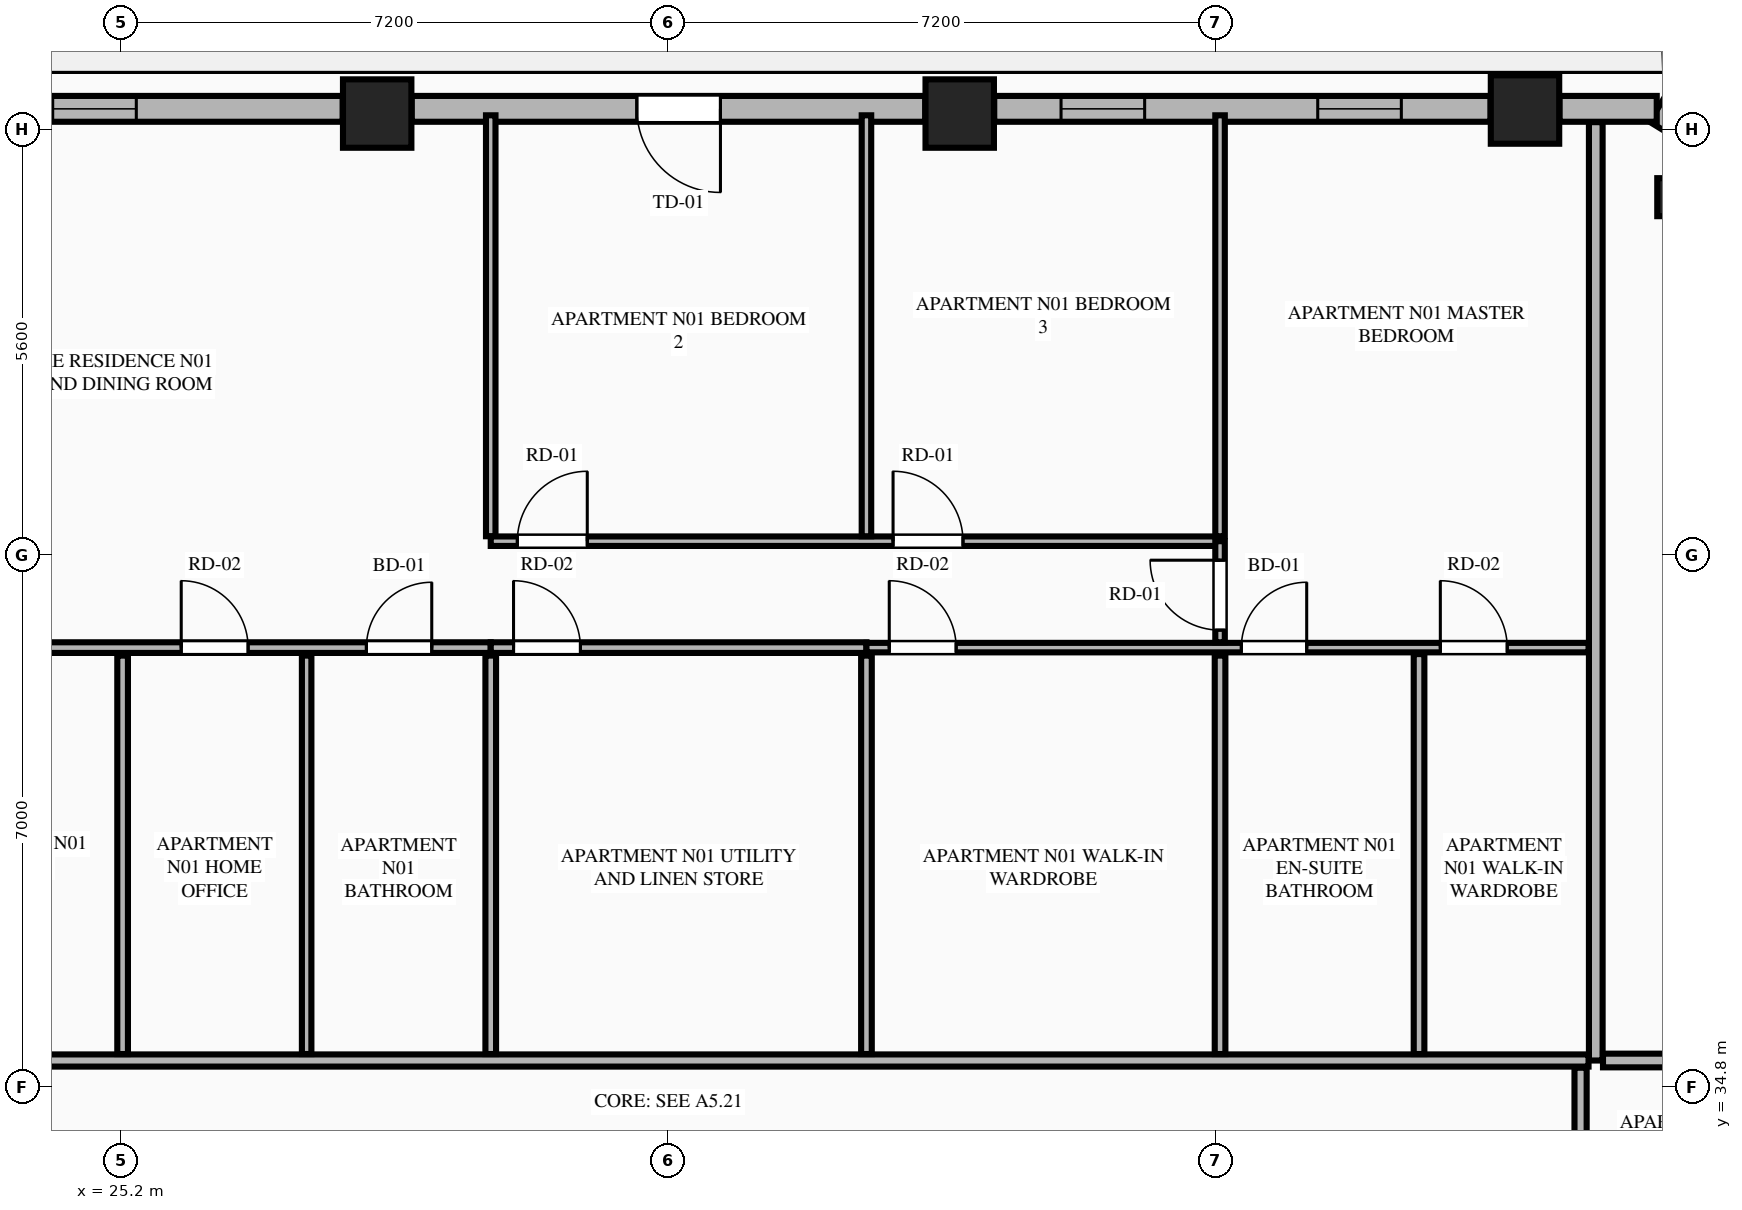
"""IFC4 building model, lengths in metres.
Left out: names, types, materials, properties, quantities, classifications, styles, units other than length and angle.
Written with IfcOpenShell. Run it as: python <this file> out.ifc"""

import sys

from ifc_helpers import new_model, si_unit, direction, frame, frame_2d, origin, origin_2d, place, context, subcontext, project, spatial, rectangle, extrude, element, fill, save


model = new_model("IFC4")
c1 = context("Model", 3, precision=1e-05, world=origin(), true_north=direction((0.0, 1.0)))
c2 = subcontext(c1, "Body", "Model", "MODEL_VIEW")
j1 = project(units=[si_unit("LENGTHUNIT", "METRE"), si_unit("PLANEANGLEUNIT", "RADIAN")], contexts=[c1])
p1 = place(None, origin())
s1 = spatial("IfcSite", under=j1, at=p1, CompositionType="ELEMENT")
p2 = place(p1, origin())
s2 = spatial("IfcBuilding", under=s1, at=p2, CompositionType="ELEMENT")
p3 = place(p2, frame((0.0, 0.0, 160.6)))
s3 = spatial("IfcBuildingStorey", under=s2, at=p3, CompositionType="ELEMENT", Elevation=160.6)
for number, where, z_axis, x_axis in (
    (1, (43.669, 47.661, 0.0), (0.0, 0.0, 1.0), (1.0, 0.0, 0.0)),
    (2, (36.232, 47.608, 0.0), (0.0, 0.0, 1.0), (1.0, 0.0, 0.0)),
    (3, (28.568, 47.608, 0.0), (0.0, 0.0, 1.0), (1.0, 0.0, 0.0)),
):
    element("IfcColumn", number, at=place(p3, frame(where, z_axis=z_axis, x_axis=x_axis)), inside=s3, PredefinedType="COLUMN", context=c2, shape_type="SweptSolid", body=[
        extrude(rectangle(XDim=0.9, YDim=0.9, at=origin_2d()), origin(), (0.0, 0.0, 1.0), 3.55),
    ])
p4 = place(p3, frame((45.659, 46.508, 0.0), z_axis=(0.0, 0.0, 1.0), x_axis=(-0.865160173452, 0.501495637342, 0.0)))
e4 = element("IfcColumn", 4, at=p4, inside=s3, PredefinedType="PILASTER", context=c2, shape_type="SweptSolid", body=[
    extrude(rectangle(XDim=0.5, YDim=0.35, at=origin_2d()), origin(), (0.0, 0.0, 1.0), 3.55),
])
p5 = place(p3, frame((46.971, 46.677, 0.0), z_axis=(0.0, 0.0, 1.0), x_axis=(-0.851798915137, 0.523868884523, 0.0)))
e5 = element("IfcWall", 5, at=p5, inside=s3, PredefinedType="STANDARD", context=c2, shape_type="SweptSolid", body=[
    extrude(rectangle(XDim=1.848, YDim=0.34, at=frame_2d((0.924, 0.0))), origin(), (0.0, 0.0, 1.0), 3.34),
])
p6 = place(p3, frame((45.402, 47.67, 0.0), z_axis=(0.0, 0.0, 1.0), x_axis=(-1.0, 0.0, 0.0)))
e6 = element("IfcWall", 6, at=p6, inside=s3, PredefinedType="STANDARD", context=c2, shape_type="SweptSolid", body=[
    extrude(rectangle(XDim=1.279, YDim=0.34, at=frame_2d((0.64, 0.0))), origin(), (0.0, 0.0, 1.0), 3.34),
])
p7 = place(p3, frame((43.215, 47.67, 0.0), z_axis=(0.0, 0.0, 1.0), x_axis=(-1.0, 0.0, 0.0)))
e7 = element("IfcWall", 7, at=p7, inside=s3, PredefinedType="STANDARD", context=c2, shape_type="SweptSolid", body=[
    extrude(rectangle(XDim=6.529, YDim=0.34, at=frame_2d((3.265, 0.0))), origin(), (0.0, 0.0, 1.0), 2.797),
])
p8 = place(p7, frame((1.173, 0.0, 0.75)))
e8 = element("IfcOpeningElement", 8, at=p8, cuts=e7, PredefinedType="OPENING", context=c2, shape_type="SweptSolid", body=[
    extrude(rectangle(XDim=1.1, YDim=1.897, at=frame_2d((0.55, 0.948))), frame((0.0, 0.18, 0.0), z_axis=(0.0, -1.0, 0.0), x_axis=(1.0, 0.0, 0.0)), (0.0, 0.0, 1.0), 0.36),
])
p9 = place(p7, frame((4.55, 0.0, 0.75)))
e9 = element("IfcOpeningElement", 9, at=p9, cuts=e7, PredefinedType="OPENING", context=c2, shape_type="SweptSolid", body=[
    extrude(rectangle(XDim=1.1, YDim=1.897, at=frame_2d((0.55, 0.948))), frame((0.0, 0.18, 0.0), z_axis=(0.0, -1.0, 0.0), x_axis=(1.0, 0.0, 0.0)), (0.0, 0.0, 1.0), 0.36),
])
p10 = place(p3, frame((35.778, 47.67, 0.0), z_axis=(0.0, 0.0, 1.0), x_axis=(-1.0, 0.0, 0.0)))
e10 = element("IfcWall", 10, at=p10, inside=s3, PredefinedType="STANDARD", context=c2, shape_type="SweptSolid", body=[
    extrude(rectangle(XDim=6.756, YDim=0.34, at=frame_2d((3.378, 0.0))), origin(), (0.0, 0.0, 1.0), 2.797),
])
p11 = place(p10, frame((2.694, 0.0, 0.0)))
e11 = element("IfcOpeningElement", 11, at=p11, cuts=e10, PredefinedType="OPENING", context=c2, shape_type="SweptSolid", body=[
    extrude(rectangle(XDim=1.1, YDim=2.25, at=frame_2d((0.55, 1.125))), frame((0.0, 0.18, 0.0), z_axis=(0.0, -1.0, 0.0), x_axis=(1.0, 0.0, 0.0)), (0.0, 0.0, 1.0), 0.36),
])
p12 = place(p3, frame((28.114, 47.67, 0.0), z_axis=(0.0, 0.0, 1.0), x_axis=(-1.0, 0.0, 0.0)))
e12 = element("IfcWall", 12, at=p12, inside=s3, PredefinedType="STANDARD", context=c2, shape_type="SweptSolid", body=[
    extrude(rectangle(XDim=6.529, YDim=0.34, at=frame_2d((3.265, 0.0))), origin(), (0.0, 0.0, 1.0), 2.797),
])
p13 = place(p12, frame((2.715, 0.0, 0.75)))
e13 = element("IfcOpeningElement", 13, at=p13, cuts=e12, PredefinedType="OPENING", context=c2, shape_type="SweptSolid", body=[
    extrude(rectangle(XDim=1.1, YDim=1.897, at=frame_2d((0.55, 0.948))), frame((0.0, 0.18, 0.0), z_axis=(0.0, -1.0, 0.0), x_axis=(1.0, 0.0, 0.0)), (0.0, 0.0, 1.0), 0.36),
])
p14 = place(p3, frame((44.6, 35.15, 0.0), z_axis=(0.0, 0.0, 1.0), x_axis=(0.0, 1.0, 0.0)))
e14 = element("IfcWall", 14, at=p14, inside=s3, PredefinedType="PARTITIONING", context=c2, shape_type="SweptSolid", body=[
    extrude(rectangle(XDim=12.345, YDim=0.18, at=frame_2d((6.173, 0.0))), origin(), (0.0, 0.0, 1.0), 3.34),
])
p15 = place(p3, frame((20.295, 35.15, 0.0), z_axis=(0.0, 0.0, 1.0), x_axis=(1.0, 0.0, 0.0)))
e15 = element("IfcWall", 15, at=p15, inside=s3, PredefinedType="PARTITIONING", context=c2, shape_type="SweptSolid", body=[
    extrude(rectangle(XDim=24.21, YDim=0.16, at=frame_2d((12.105, 0.0))), origin(), (0.0, 0.0, 1.0), 3.34),
])
p16 = place(p15, frame((0.405, 0.0, 0.0)))
e16 = element("IfcOpeningElement", 16, at=p16, cuts=e15, PredefinedType="OPENING", context=c2, shape_type="SweptSolid", body=[
    extrude(rectangle(XDim=1.35, YDim=2.35, at=frame_2d((0.675, 1.175))), frame((0.0, 0.09, 0.0), z_axis=(0.0, -1.0, 0.0), x_axis=(1.0, 0.0, 0.0)), (0.0, 0.0, 1.0), 0.18),
])
p17 = place(p3, frame((22.25, 40.582, 0.0), z_axis=(0.0, 0.0, 1.0), x_axis=(1.0, 0.0, 0.0)))
e17 = element("IfcWall", 17, at=p17, inside=s3, PredefinedType="PLUMBINGWALL", context=c2, shape_type="SweptSolid", body=[
    extrude(rectangle(XDim=7.812, YDim=0.14, at=frame_2d((3.906, 0.0))), origin(), (0.0, 0.0, 1.0), 3.34),
])
p18 = place(p17, frame((6.176, 0.0, 0.0)))
e18 = element("IfcOpeningElement", 18, at=p18, cuts=e17, PredefinedType="OPENING", context=c2, shape_type="SweptSolid", body=[
    extrude(rectangle(XDim=0.86, YDim=2.1, at=frame_2d((0.43, 1.05))), frame((0.0, 0.08, 0.0), z_axis=(0.0, -1.0, 0.0), x_axis=(1.0, 0.0, 0.0)), (0.0, 0.0, 1.0), 0.16),
])
p19 = place(p17, frame((0.26, 0.0, 0.0)))
e19 = element("IfcOpeningElement", 19, at=p19, cuts=e17, PredefinedType="OPENING", context=c2, shape_type="SweptSolid", body=[
    extrude(rectangle(XDim=0.88, YDim=2.15, at=frame_2d((0.44, 1.075))), frame((0.0, 0.08, 0.0), z_axis=(0.0, -1.0, 0.0), x_axis=(1.0, 0.0, 0.0)), (0.0, 0.0, 1.0), 0.16),
])
p20 = place(p17, frame((3.74, 0.0, 0.0)))
e20 = element("IfcOpeningElement", 20, at=p20, cuts=e17, PredefinedType="OPENING", context=c2, shape_type="SweptSolid", body=[
    extrude(rectangle(XDim=0.88, YDim=2.15, at=frame_2d((0.44, 1.075))), frame((0.0, 0.08, 0.0), z_axis=(0.0, -1.0, 0.0), x_axis=(1.0, 0.0, 0.0)), (0.0, 0.0, 1.0), 0.16),
])
p21 = place(p3, frame((30.062, 40.582, 0.0), z_axis=(0.0, 0.0, 1.0), x_axis=(1.0, 0.0, 0.0)))
e21 = element("IfcWall", 21, at=p21, inside=s3, PredefinedType="PLUMBINGWALL", context=c2, shape_type="SweptSolid", body=[
    extrude(rectangle(XDim=4.943, YDim=0.14, at=frame_2d((2.471, 0.0))), origin(), (0.0, 0.0, 1.0), 3.34),
])
p22 = place(p21, frame((0.3, 0.0, 0.0)))
e22 = element("IfcOpeningElement", 22, at=p22, cuts=e21, PredefinedType="OPENING", context=c2, shape_type="SweptSolid", body=[
    extrude(rectangle(XDim=0.88, YDim=2.15, at=frame_2d((0.44, 1.075))), frame((0.0, 0.08, 0.0), z_axis=(0.0, -1.0, 0.0), x_axis=(1.0, 0.0, 0.0)), (0.0, 0.0, 1.0), 0.16),
])
p23 = place(p3, frame((35.005, 40.582, 0.0), z_axis=(0.0, 0.0, 1.0), x_axis=(1.0, 0.0, 0.0)))
e23 = element("IfcWall", 23, at=p23, inside=s3, PredefinedType="PARTITIONING", context=c2, shape_type="SweptSolid", body=[
    extrude(rectangle(XDim=9.5, YDim=0.125, at=frame_2d((4.75, 0.0))), origin(), (0.0, 0.0, 1.0), 3.34),
])
p24 = place(p23, frame((4.932, 0.0, 0.0)))
e24 = element("IfcOpeningElement", 24, at=p24, cuts=e23, PredefinedType="OPENING", context=c2, shape_type="SweptSolid", body=[
    extrude(rectangle(XDim=0.86, YDim=2.1, at=frame_2d((0.43, 1.05))), frame((0.0, 0.073, 0.0), z_axis=(0.0, -1.0, 0.0), x_axis=(1.0, 0.0, 0.0)), (0.0, 0.0, 1.0), 0.145),
])
p25 = place(p23, frame((7.55, 0.0, 0.0)))
e25 = element("IfcOpeningElement", 25, at=p25, cuts=e23, PredefinedType="OPENING", context=c2, shape_type="SweptSolid", body=[
    extrude(rectangle(XDim=0.88, YDim=2.15, at=frame_2d((0.44, 1.075))), frame((0.0, 0.073, 0.0), z_axis=(0.0, -1.0, 0.0), x_axis=(1.0, 0.0, 0.0)), (0.0, 0.0, 1.0), 0.145),
])
p26 = place(p23, frame((0.3, 0.0, 0.0)))
e26 = element("IfcOpeningElement", 26, at=p26, cuts=e23, PredefinedType="OPENING", context=c2, shape_type="SweptSolid", body=[
    extrude(rectangle(XDim=0.88, YDim=2.15, at=frame_2d((0.44, 1.075))), frame((0.0, 0.073, 0.0), z_axis=(0.0, -1.0, 0.0), x_axis=(1.0, 0.0, 0.0)), (0.0, 0.0, 1.0), 0.145),
])
p27 = place(p3, frame((25.219, 35.235, 0.0), z_axis=(0.0, 0.0, 1.0), x_axis=(0.0, 1.0, 0.0)))
e27 = element("IfcWall", 27, at=p27, inside=s3, PredefinedType="PLUMBINGWALL", context=c2, shape_type="SweptSolid", body=[
    extrude(rectangle(XDim=5.242, YDim=0.14, at=frame_2d((2.621, 0.0))), origin(), (0.0, 0.0, 1.0), 3.34),
])
p28 = place(p3, frame((27.64, 35.235, 0.0), z_axis=(0.0, 0.0, 1.0), x_axis=(0.0, 1.0, 0.0)))
e28 = element("IfcWall", 28, at=p28, inside=s3, PredefinedType="PARTITIONING", context=c2, shape_type="SweptSolid", body=[
    extrude(rectangle(XDim=5.242, YDim=0.125, at=frame_2d((2.621, 0.0))), origin(), (0.0, 0.0, 1.0), 3.34),
])
p29 = place(p3, frame((30.062, 42.047, 0.0), z_axis=(0.0, 0.0, 1.0), x_axis=(0.0, 1.0, 0.0)))
e29 = element("IfcWall", 29, at=p29, inside=s3, PredefinedType="PARTITIONING", context=c2, shape_type="SweptSolid", body=[
    extrude(rectangle(XDim=5.538, YDim=0.125, at=frame_2d((2.769, 0.0))), origin(), (0.0, 0.0, 1.0), 3.34),
])
p30 = place(p3, frame((30.062, 41.982, 0.0), z_axis=(0.0, 0.0, 1.0), x_axis=(1.0, 0.0, 0.0)))
e30 = element("IfcWall", 30, at=p30, inside=s3, PredefinedType="PARTITIONING", context=c2, shape_type="SweptSolid", body=[
    extrude(rectangle(XDim=9.595, YDim=0.125, at=frame_2d((4.797, 0.0))), origin(), (0.0, 0.0, 1.0), 3.34),
])
p31 = place(p30, frame((0.35, 0.0, 0.0)))
e31 = element("IfcOpeningElement", 31, at=p31, cuts=e30, PredefinedType="OPENING", context=c2, shape_type="SweptSolid", body=[
    extrude(rectangle(XDim=0.92, YDim=2.15, at=frame_2d((0.46, 1.075))), frame((0.0, 0.073, 0.0), z_axis=(0.0, -1.0, 0.0), x_axis=(1.0, 0.0, 0.0)), (0.0, 0.0, 1.0), 0.145),
])
p32 = place(p30, frame((5.293, 0.0, 0.0)))
e32 = element("IfcOpeningElement", 32, at=p32, cuts=e30, PredefinedType="OPENING", context=c2, shape_type="SweptSolid", body=[
    extrude(rectangle(XDim=0.92, YDim=2.15, at=frame_2d((0.46, 1.075))), frame((0.0, 0.073, 0.0), z_axis=(0.0, -1.0, 0.0), x_axis=(1.0, 0.0, 0.0)), (0.0, 0.0, 1.0), 0.145),
])
p33 = place(p3, frame((39.657, 40.652, 0.0), z_axis=(0.0, 0.0, 1.0), x_axis=(0.0, 1.0, 0.0)))
e33 = element("IfcWall", 33, at=p33, inside=s3, PredefinedType="PARTITIONING", context=c2, shape_type="SweptSolid", body=[
    extrude(rectangle(XDim=1.33, YDim=0.125, at=frame_2d((0.665, 0.0))), origin(), (0.0, 0.0, 1.0), 3.34),
])
p34 = place(p33, frame((0.16, 0.0, 0.0)))
e34 = element("IfcOpeningElement", 34, at=p34, cuts=e33, PredefinedType="OPENING", context=c2, shape_type="SweptSolid", body=[
    extrude(rectangle(XDim=0.92, YDim=2.15, at=frame_2d((0.46, 1.075))), frame((0.0, 0.073, 0.0), z_axis=(0.0, -1.0, 0.0), x_axis=(1.0, 0.0, 0.0)), (0.0, 0.0, 1.0), 0.145),
])
for number, where, z_axis, x_axis in (
    (35, (30.062, 35.235, 0.0), (0.0, 0.0, 1.0), (0.0, 1.0, 0.0)),
    (36, (35.005, 35.235, 0.0), (0.0, 0.0, 1.0), (0.0, 1.0, 0.0)),
):
    element("IfcWall", number, at=place(p3, frame(where, z_axis=z_axis, x_axis=x_axis)), inside=s3, PredefinedType="PLUMBINGWALL", context=c2, shape_type="SweptSolid", body=[
        extrude(rectangle(XDim=5.242, YDim=0.14, at=frame_2d((2.621, 0.0))), origin(), (0.0, 0.0, 1.0), 3.34),
    ])
for number, where, z_axis, x_axis in (
    (37, (35.005, 42.047, 0.0), (0.0, 0.0, 1.0), (0.0, 1.0, 0.0)),
    (38, (39.657, 42.047, 0.0), (0.0, 0.0, 1.0), (0.0, 1.0, 0.0)),
):
    element("IfcWall", number, at=place(p3, frame(where, z_axis=z_axis, x_axis=x_axis)), inside=s3, PredefinedType="PARTITIONING", context=c2, shape_type="SweptSolid", body=[
        extrude(rectangle(XDim=5.538, YDim=0.125, at=frame_2d((2.769, 0.0))), origin(), (0.0, 0.0, 1.0), 3.34),
    ])
p35 = place(p3, frame((39.657, 35.235, 0.0), z_axis=(0.0, 0.0, 1.0), x_axis=(0.0, 1.0, 0.0)))
e39 = element("IfcWall", 39, at=p35, inside=s3, PredefinedType="PLUMBINGWALL", context=c2, shape_type="SweptSolid", body=[
    extrude(rectangle(XDim=5.242, YDim=0.14, at=frame_2d((2.621, 0.0))), origin(), (0.0, 0.0, 1.0), 3.34),
])
p36 = place(p3, frame((42.275, 35.235, 0.0), z_axis=(0.0, 0.0, 1.0), x_axis=(0.0, 1.0, 0.0)))
e40 = element("IfcWall", 40, at=p36, inside=s3, PredefinedType="PLUMBINGWALL", context=c2, shape_type="SweptSolid", body=[
    extrude(rectangle(XDim=5.262, YDim=0.14, at=frame_2d((2.631, 0.0))), origin(), (0.0, 0.0, 1.0), 2.722),
])
p37 = place(p3, frame((44.695, 35.15, 0.0), z_axis=(0.0, 0.0, 1.0), x_axis=(1.0, 0.0, 0.0)))
e41 = element("IfcWall", 41, at=p37, inside=s3, PredefinedType="PARTITIONING", context=c2, shape_type="SweptSolid", body=[
    extrude(rectangle(XDim=7.895, YDim=0.18, at=frame_2d((3.948, 0.0))), origin(), (0.0, 0.0, 1.0), 3.34),
])
p38 = place(p3, frame((44.4, 16.745, 0.0), z_axis=(0.0, 0.0, 1.0), x_axis=(0.0, 1.0, 0.0)))
e42 = element("IfcWall", 42, at=p38, inside=s3, PredefinedType="PARTITIONING", context=c2, shape_type="SweptSolid", body=[
    extrude(rectangle(XDim=18.31, YDim=0.16, at=frame_2d((9.155, 0.0))), origin(), (0.0, 0.0, 1.0), 3.34),
])
p39 = place(p38, frame((0.45, 0.0, 0.0)))
e43 = element("IfcOpeningElement", 43, at=p39, cuts=e42, PredefinedType="OPENING", context=c2, shape_type="SweptSolid", body=[
    extrude(rectangle(XDim=1.02, YDim=2.25, at=frame_2d((0.51, 1.125))), frame((0.0, 0.09, 0.0), z_axis=(0.0, -1.0, 0.0), x_axis=(1.0, 0.0, 0.0)), (0.0, 0.0, 1.0), 0.18),
])
p40 = place(p8, origin())
e44 = element("IfcWindow", 44, at=p40, inside=s3, PartitioningType="SINGLE_PANEL", PredefinedType="WINDOW", context=c2, shape_type="SweptSolid", body=[
    extrude(rectangle(XDim=1.1, YDim=1.897, at=frame_2d((0.55, 0.948))), frame((0.0, 0.03, 0.0), z_axis=(0.0, -1.0, 0.0), x_axis=(1.0, 0.0, 0.0)), (0.0, 0.0, 1.0), 0.06),
])
fill(e8, e44)
p41 = place(p11, origin())
e45 = element("IfcDoor", 45, at=p41, inside=s3, OperationType="SINGLE_SWING_LEFT", PredefinedType="DOOR", context=c2, shape_type="SweptSolid", body=[
    extrude(rectangle(XDim=1.1, YDim=2.25, at=frame_2d((0.55, 1.125))), frame((0.0, 0.025, 0.0), z_axis=(0.0, -1.0, 0.0), x_axis=(1.0, 0.0, 0.0)), (0.0, 0.0, 1.0), 0.05),
])
fill(e11, e45)
p42 = place(p13, origin())
e46 = element("IfcWindow", 46, at=p42, inside=s3, PartitioningType="SINGLE_PANEL", PredefinedType="WINDOW", context=c2, shape_type="SweptSolid", body=[
    extrude(rectangle(XDim=1.1, YDim=1.897, at=frame_2d((0.55, 0.948))), frame((0.0, 0.03, 0.0), z_axis=(0.0, -1.0, 0.0), x_axis=(1.0, 0.0, 0.0)), (0.0, 0.0, 1.0), 0.06),
])
fill(e13, e46)
p43 = place(p18, origin())
e47 = element("IfcDoor", 47, at=p43, inside=s3, OperationType="SINGLE_SWING_RIGHT", PredefinedType="DOOR", context=c2, shape_type="SweptSolid", body=[
    extrude(rectangle(XDim=0.86, YDim=2.1, at=frame_2d((0.43, 1.05))), frame((0.0, 0.025, 0.0), z_axis=(0.0, -1.0, 0.0), x_axis=(1.0, 0.0, 0.0)), (0.0, 0.0, 1.0), 0.05),
])
fill(e18, e47)
p44 = place(p24, origin())
e48 = element("IfcDoor", 48, at=p44, inside=s3, OperationType="SINGLE_SWING_RIGHT", PredefinedType="DOOR", context=c2, shape_type="SweptSolid", body=[
    extrude(rectangle(XDim=0.86, YDim=2.1, at=frame_2d((0.43, 1.05))), frame((0.0, 0.025, 0.0), z_axis=(0.0, -1.0, 0.0), x_axis=(1.0, 0.0, 0.0)), (0.0, 0.0, 1.0), 0.05),
])
fill(e24, e48)
p45 = place(p25, origin())
e49 = element("IfcDoor", 49, at=p45, inside=s3, OperationType="SINGLE_SWING_LEFT", PredefinedType="DOOR", context=c2, shape_type="SweptSolid", body=[
    extrude(rectangle(XDim=0.88, YDim=2.15, at=frame_2d((0.44, 1.075))), frame((0.0, 0.025, 0.0), z_axis=(0.0, -1.0, 0.0), x_axis=(1.0, 0.0, 0.0)), (0.0, 0.0, 1.0), 0.05),
])
fill(e25, e49)
p46 = place(p20, origin())
e50 = element("IfcDoor", 50, at=p46, inside=s3, OperationType="SINGLE_SWING_LEFT", PredefinedType="DOOR", context=c2, shape_type="SweptSolid", body=[
    extrude(rectangle(XDim=0.88, YDim=2.15, at=frame_2d((0.44, 1.075))), frame((0.0, 0.025, 0.0), z_axis=(0.0, -1.0, 0.0), x_axis=(1.0, 0.0, 0.0)), (0.0, 0.0, 1.0), 0.05),
])
fill(e20, e50)
p47 = place(p22, origin())
e51 = element("IfcDoor", 51, at=p47, inside=s3, OperationType="SINGLE_SWING_LEFT", PredefinedType="DOOR", context=c2, shape_type="SweptSolid", body=[
    extrude(rectangle(XDim=0.88, YDim=2.15, at=frame_2d((0.44, 1.075))), frame((0.0, 0.025, 0.0), z_axis=(0.0, -1.0, 0.0), x_axis=(1.0, 0.0, 0.0)), (0.0, 0.0, 1.0), 0.05),
])
fill(e22, e51)
p48 = place(p31, origin())
e52 = element("IfcDoor", 52, at=p48, inside=s3, OperationType="SINGLE_SWING_RIGHT", PredefinedType="DOOR", context=c2, shape_type="SweptSolid", body=[
    extrude(rectangle(XDim=0.92, YDim=2.15, at=frame_2d((0.46, 1.075))), frame((0.0, 0.025, 0.0), z_axis=(0.0, -1.0, 0.0), x_axis=(1.0, 0.0, 0.0)), (0.0, 0.0, 1.0), 0.05),
])
fill(e31, e52)
p49 = place(p32, origin())
e53 = element("IfcDoor", 53, at=p49, inside=s3, OperationType="SINGLE_SWING_LEFT", PredefinedType="DOOR", context=c2, shape_type="SweptSolid", body=[
    extrude(rectangle(XDim=0.92, YDim=2.15, at=frame_2d((0.46, 1.075))), frame((0.0, 0.025, 0.0), z_axis=(0.0, -1.0, 0.0), x_axis=(1.0, 0.0, 0.0)), (0.0, 0.0, 1.0), 0.05),
])
fill(e32, e53)
p50 = place(p34, origin())
e54 = element("IfcDoor", 54, at=p50, inside=s3, OperationType="SINGLE_SWING_RIGHT", PredefinedType="DOOR", context=c2, shape_type="SweptSolid", body=[
    extrude(rectangle(XDim=0.92, YDim=2.15, at=frame_2d((0.46, 1.075))), frame((0.0, 0.025, 0.0), z_axis=(0.0, -1.0, 0.0), x_axis=(1.0, 0.0, 0.0)), (0.0, 0.0, 1.0), 0.05),
])
fill(e34, e54)
p51 = place(p26, origin())
e55 = element("IfcDoor", 55, at=p51, inside=s3, OperationType="SINGLE_SWING_LEFT", PredefinedType="DOOR", context=c2, shape_type="SweptSolid", body=[
    extrude(rectangle(XDim=0.88, YDim=2.15, at=frame_2d((0.44, 1.075))), frame((0.0, 0.025, 0.0), z_axis=(0.0, -1.0, 0.0), x_axis=(1.0, 0.0, 0.0)), (0.0, 0.0, 1.0), 0.05),
])
fill(e26, e55)
p52 = place(p9, origin())
e56 = element("IfcWindow", 56, at=p52, inside=s3, PartitioningType="SINGLE_PANEL", PredefinedType="WINDOW", context=c2, shape_type="SweptSolid", body=[
    extrude(rectangle(XDim=1.1, YDim=1.897, at=frame_2d((0.55, 0.948))), frame((0.0, 0.03, 0.0), z_axis=(0.0, -1.0, 0.0), x_axis=(1.0, 0.0, 0.0)), (0.0, 0.0, 1.0), 0.06),
])
fill(e9, e56)
save(model, sys.argv[1])
